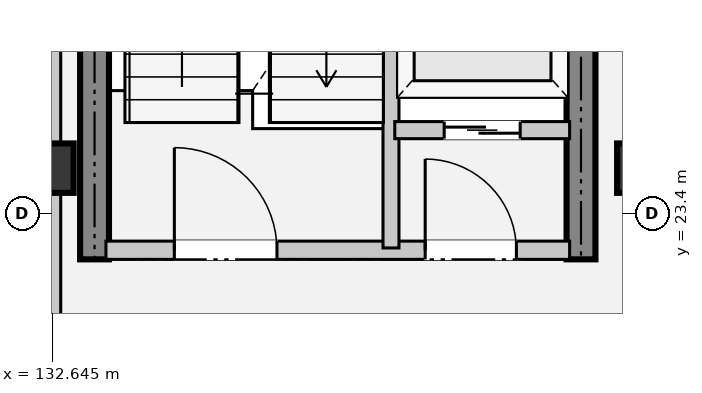
"""IFC4 building model, lengths in metres.
Left out: names, types, materials, properties, quantities, classifications, styles, units other than length and angle.
Written with IfcOpenShell. Run it as: python <this file> out.ifc"""

import sys

from ifc_helpers import new_model, si_unit, direction, frame, frame_2d, origin, origin_2d, place, context, subcontext, project, spatial, rectangle, extrude, element, fill, save


model = new_model("IFC4")
c1 = context("Model", 3, precision=1e-05, world=origin(), true_north=direction((0.0, 1.0)))
c2 = subcontext(c1, "Body", "Model", "MODEL_VIEW")
j1 = project(units=[si_unit("LENGTHUNIT", "METRE"), si_unit("PLANEANGLEUNIT", "RADIAN")], contexts=[c1])
p1 = place(None, origin())
s1 = spatial("IfcSite", under=j1, at=p1, CompositionType="ELEMENT")
p2 = place(p1, origin())
s2 = spatial("IfcBuilding", under=s1, at=p2, CompositionType="ELEMENT")
p3 = place(p2, frame((0.0, 0.0, 10.2)))
s3 = spatial("IfcBuildingStorey", under=s2, at=p3, CompositionType="ELEMENT", Elevation=10.2)
for number, where, z_axis, x_axis in (
    (1, (132.6, 24.0, 0.0), (0.0, 0.0, 1.0), (1.0, 0.0, 0.0)),
    (2, (140.4, 24.0, 0.0), (0.0, 0.0, 1.0), (1.0, 0.0, 0.0)),
):
    element("IfcColumn", number, at=place(p3, frame(where, z_axis=z_axis, x_axis=x_axis)), inside=s3, PredefinedType="COLUMN", context=c2, shape_type="SweptSolid", body=[
        extrude(rectangle(XDim=0.65, YDim=0.65, at=origin_2d()), origin(), (0.0, 0.0, 1.0), 4.8),
    ])
for number, where, z_axis, x_axis in (
    (3, (133.2, 22.8, 0.0), (0.0, 0.0, 1.0), (0.0, 1.0, 0.0)),
    (4, (139.6, 22.8, 0.0), (0.0, 0.0, 1.0), (0.0, 1.0, 0.0)),
):
    element("IfcWall", number, at=place(p3, frame(where, z_axis=z_axis, x_axis=x_axis)), inside=s3, PredefinedType="SHEAR", context=c2, shape_type="SweptSolid", body=[
        extrude(rectangle(XDim=8.6, YDim=0.38, at=frame_2d((4.3, 0.0))), origin(), (0.0, 0.0, 1.0), 4.8),
    ])
p4 = place(p3, frame((133.35, 22.92, 0.0), z_axis=(0.0, 0.0, 1.0), x_axis=(1.0, 0.0, 0.0)))
e5 = element("IfcWall", 5, at=p4, inside=s3, PredefinedType="PARTITIONING", context=c2, shape_type="SweptSolid", body=[
    extrude(rectangle(XDim=6.1, YDim=0.24, at=frame_2d((3.05, 0.0))), origin(), (0.0, 0.0, 1.0), 3.86),
])
p5 = place(p4, frame((0.9, 0.0, 0.0)))
e6 = element("IfcOpeningElement", 6, at=p5, cuts=e5, PredefinedType="OPENING", context=c2, shape_type="SweptSolid", body=[
    extrude(rectangle(XDim=1.35, YDim=2.2, at=frame_2d((0.675, 1.1))), frame((0.0, 0.13, 0.0), z_axis=(0.0, -1.0, 0.0), x_axis=(1.0, 0.0, 0.0)), (0.0, 0.0, 1.0), 0.26),
])
p6 = place(p4, frame((4.2, 0.0, 0.0)))
e7 = element("IfcOpeningElement", 7, at=p6, cuts=e5, PredefinedType="OPENING", context=c2, shape_type="SweptSolid", body=[
    extrude(rectangle(XDim=1.2, YDim=2.2, at=frame_2d((0.6, 1.1))), frame((0.0, 0.13, 0.0), z_axis=(0.0, -1.0, 0.0), x_axis=(1.0, 0.0, 0.0)), (0.0, 0.0, 1.0), 0.26),
])
p7 = place(p3, frame((137.1, 22.95, 0.0), z_axis=(0.0, 0.0, 1.0), x_axis=(0.0, 1.0, 0.0)))
e8 = element("IfcWall", 8, at=p7, inside=s3, PredefinedType="PARTITIONING", context=c2, shape_type="SweptSolid", body=[
    extrude(rectangle(XDim=8.3, YDim=0.21, at=frame_2d((4.15, 0.0))), origin(), (0.0, 0.0, 1.0), 3.86),
])
p8 = place(p3, frame((137.15, 24.5, 0.0), z_axis=(0.0, 0.0, 1.0), x_axis=(1.0, 0.0, 0.0)))
e9 = element("IfcWall", 9, at=p8, inside=s3, PredefinedType="PARTITIONING", context=c2, shape_type="SweptSolid", body=[
    extrude(rectangle(XDim=2.3, YDim=0.225, at=frame_2d((1.15, 0.0))), origin(), (0.0, 0.0, 1.0), 3.86),
])
p9 = place(p8, frame((0.65, 0.0, 0.0)))
e10 = element("IfcOpeningElement", 10, at=p9, cuts=e9, PredefinedType="OPENING", context=c2, shape_type="SweptSolid", body=[
    extrude(rectangle(XDim=1.0, YDim=2.15, at=frame_2d((0.5, 1.075))), frame((0.0, 0.123, 0.0), z_axis=(0.0, -1.0, 0.0), x_axis=(1.0, 0.0, 0.0)), (0.0, 0.0, 1.0), 0.245),
])
p10 = place(p3, frame((132.66, 16.54, 0.0), z_axis=(0.0, 0.0, 1.0), x_axis=(0.0, 1.0, 0.0)))
e11 = element("IfcWall", 11, at=p10, inside=s3, PredefinedType="PARAPET", context=c2, shape_type="SweptSolid", body=[
    extrude(rectangle(XDim=15.4, YDim=0.19, at=frame_2d((7.7, 0.0))), origin(), (0.0, 0.0, 1.0), 1.12),
])
p11 = place(p5, origin())
e12 = element("IfcDoor", 12, at=p11, inside=s3, OperationType="SINGLE_SWING_RIGHT", PredefinedType="DOOR", context=c2, shape_type="SweptSolid", body=[
    extrude(rectangle(XDim=1.35, YDim=2.2, at=frame_2d((0.675, 1.1))), frame((0.0, 0.025, 0.0), z_axis=(0.0, -1.0, 0.0), x_axis=(1.0, 0.0, 0.0)), (0.0, 0.0, 1.0), 0.05),
])
fill(e6, e12)
p12 = place(p6, origin())
e13 = element("IfcDoor", 13, at=p12, inside=s3, OperationType="SINGLE_SWING_LEFT", PredefinedType="DOOR", context=c2, shape_type="SweptSolid", body=[
    extrude(rectangle(XDim=1.2, YDim=2.2, at=frame_2d((0.6, 1.1))), frame((0.0, 0.025, 0.0), z_axis=(0.0, -1.0, 0.0), x_axis=(1.0, 0.0, 0.0)), (0.0, 0.0, 1.0), 0.05),
])
fill(e7, e13)
p13 = place(p9, origin())
e14 = element("IfcDoor", 14, at=p13, inside=s3, OperationType="SLIDING_TO_RIGHT", PredefinedType="DOOR", context=c2, shape_type="SweptSolid", body=[
    extrude(rectangle(XDim=1.0, YDim=2.15, at=frame_2d((0.5, 1.075))), frame((0.0, 0.025, 0.0), z_axis=(0.0, -1.0, 0.0), x_axis=(1.0, 0.0, 0.0)), (0.0, 0.0, 1.0), 0.05),
])
fill(e10, e14)
save(model, sys.argv[1])
